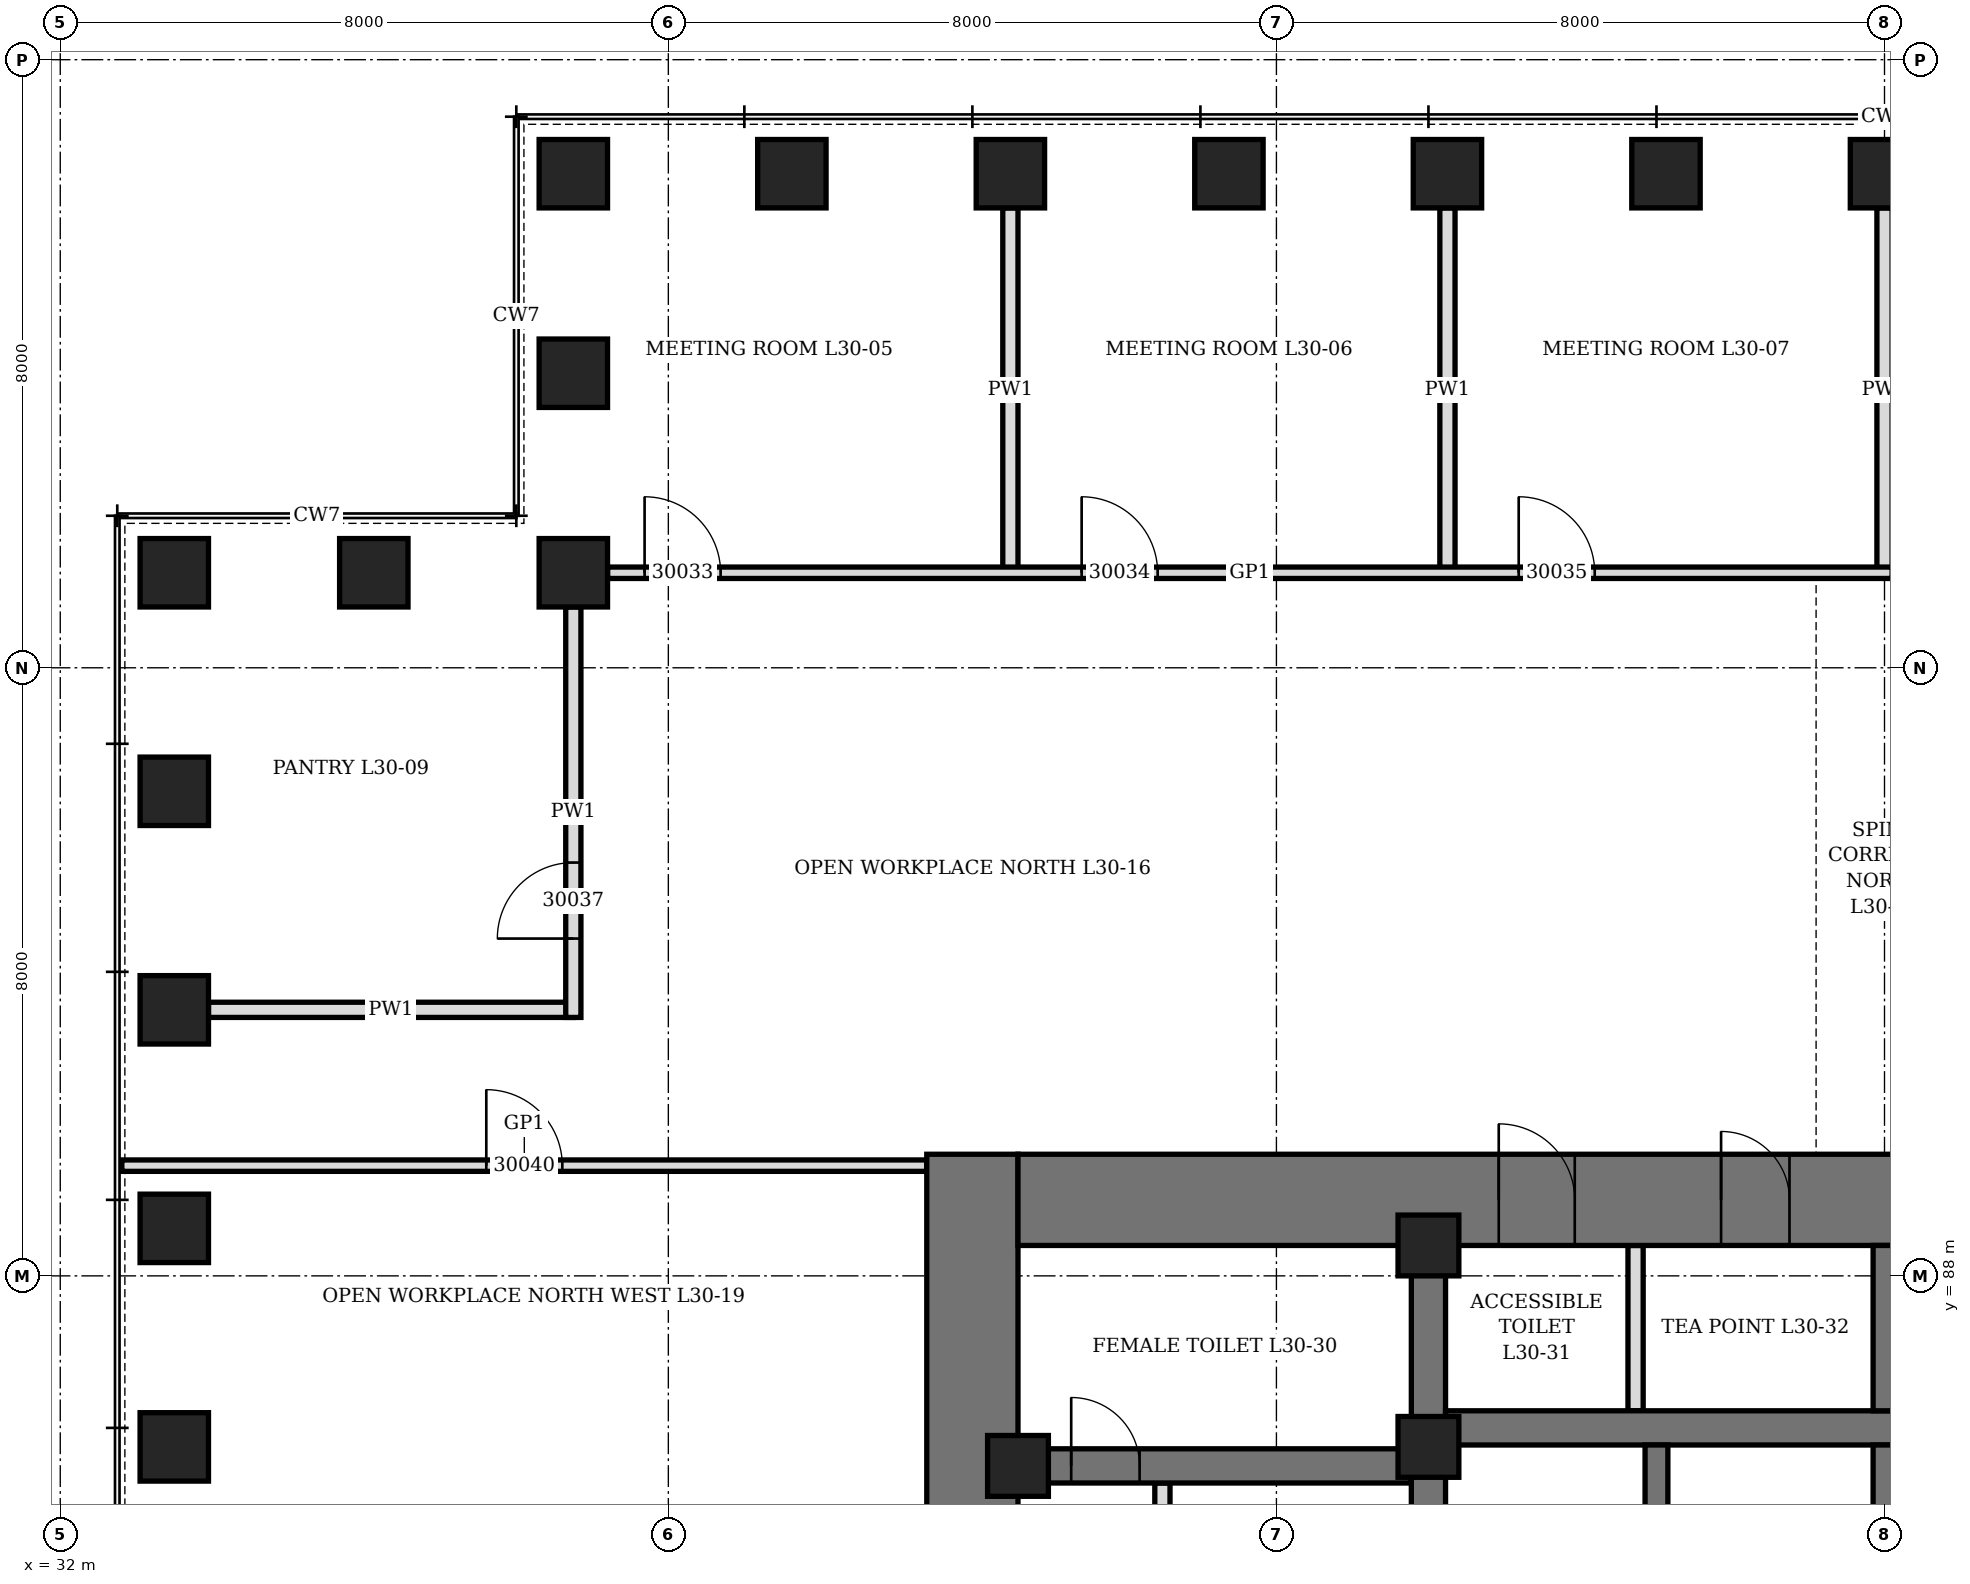
"""IFC4 building model, lengths in metres.
Left out: names, types, materials, properties, quantities, classifications, styles, units other than length and angle.
Written with IfcOpenShell. Run it as: python <this file> out.ifc"""

import sys

from ifc_helpers import new_model, si_unit, direction, frame, frame_2d, origin, origin_2d, place, context, subcontext, project, spatial, rectangle, hollow_rectangle, extrude, element, fill, save


model = new_model("IFC4")
c1 = context("Model", 3, precision=1e-05, world=origin(), true_north=direction((0.0, 1.0)))
c2 = subcontext(c1, "Body", "Model", "MODEL_VIEW")
j1 = project(units=[si_unit("LENGTHUNIT", "METRE"), si_unit("PLANEANGLEUNIT", "RADIAN")], contexts=[c1])
p1 = place(None, origin())
s1 = spatial("IfcSite", under=j1, at=p1, CompositionType="ELEMENT")
p2 = place(p1, origin())
s2 = spatial("IfcBuilding", under=s1, at=p2, CompositionType="ELEMENT")
p3 = place(p2, frame((0.0, 0.0, 137.5)))
s3 = spatial("IfcBuildingStorey", under=s2, at=p3, CompositionType="ELEMENT", Elevation=137.5)
for number, where, z_axis, x_axis in (
    (1, (56.0, 102.5, 0.0), (0.0, 0.0, 1.0), (1.0, 0.0, 0.0)),
    (2, (53.125, 102.5, 0.0), (0.0, 0.0, 1.0), (1.0, 0.0, 0.0)),
    (3, (50.25, 102.5, 0.0), (0.0, 0.0, 1.0), (1.0, 0.0, 0.0)),
    (4, (47.375, 102.5, 0.0), (0.0, 0.0, 1.0), (1.0, 0.0, 0.0)),
    (5, (44.5, 102.5, 0.0), (0.0, 0.0, 1.0), (1.0, 0.0, 0.0)),
    (6, (41.625, 102.5, 0.0), (0.0, 0.0, 1.0), (1.0, 0.0, 0.0)),
    (7, (38.75, 102.5, 0.0), (0.0, 0.0, 1.0), (0.0, 1.0, 0.0)),
    (8, (38.75, 99.875, 0.0), (0.0, 0.0, 1.0), (0.0, 1.0, 0.0)),
    (9, (38.75, 97.25, 0.0), (0.0, 0.0, 1.0), (1.0, 0.0, 0.0)),
    (10, (36.125, 97.25, 0.0), (0.0, 0.0, 1.0), (1.0, 0.0, 0.0)),
    (11, (33.5, 97.25, 0.0), (0.0, 0.0, 1.0), (0.0, 1.0, 0.0)),
    (12, (33.5, 94.375, 0.0), (0.0, 0.0, 1.0), (0.0, 1.0, 0.0)),
    (13, (33.5, 91.5, 0.0), (0.0, 0.0, 1.0), (0.0, 1.0, 0.0)),
    (14, (33.5, 88.625, 0.0), (0.0, 0.0, 1.0), (0.0, 1.0, 0.0)),
    (15, (33.5, 85.75, 0.0), (0.0, 0.0, 1.0), (0.0, 1.0, 0.0)),
):
    element("IfcColumn", number, at=place(p3, frame(where, z_axis=z_axis, x_axis=x_axis)), inside=s3, PredefinedType="COLUMN", context=c2, shape_type="SweptSolid", body=[
        extrude(hollow_rectangle(XDim=0.9, YDim=0.9, WallThickness=0.15, at=origin_2d()), origin(), (0.0, 0.0, 1.0), 4.2),
    ])
p4 = place(p3, frame((44.0, 70.4, 0.0), z_axis=(0.0, 0.0, 1.0), x_axis=(0.0, 1.0, 0.0)))
e16 = element("IfcWall", 16, at=p4, inside=s3, PredefinedType="SHEAR", context=c2, shape_type="SweptSolid", body=[
    extrude(rectangle(XDim=19.2, YDim=1.2, at=frame_2d((9.6, 0.0))), origin(), (0.0, 0.0, 1.0), 4.2),
])
p5 = place(p4, frame((8.6, 0.0, 0.0)))
e17 = element("IfcOpeningElement", 17, at=p5, cuts=e16, PredefinedType="OPENING", context=c2, shape_type="SweptSolid", body=[
    extrude(rectangle(XDim=2.0, YDim=2.4, at=frame_2d((1.0, 1.2))), frame((0.0, 0.61, 0.0), z_axis=(0.0, -1.0, 0.0), x_axis=(1.0, 0.0, 0.0)), (0.0, 0.0, 1.0), 1.22),
])
p6 = place(p3, frame((44.6, 89.0, 0.0), z_axis=(0.0, 0.0, 1.0), x_axis=(1.0, 0.0, 0.0)))
e18 = element("IfcWall", 18, at=p6, inside=s3, PredefinedType="SHEAR", context=c2, shape_type="SweptSolid", body=[
    extrude(rectangle(XDim=22.8, YDim=1.2, at=frame_2d((11.4, 0.0))), origin(), (0.0, 0.0, 1.0), 4.2),
])
p7 = place(p6, frame((6.325, 0.0, 0.0)))
e19 = element("IfcOpeningElement", 19, at=p7, cuts=e18, PredefinedType="OPENING", context=c2, shape_type="SweptSolid", body=[
    extrude(rectangle(XDim=1.0, YDim=2.1, at=frame_2d((0.5, 1.05))), frame((0.0, 0.61, 0.0), z_axis=(0.0, -1.0, 0.0), x_axis=(1.0, 0.0, 0.0)), (0.0, 0.0, 1.0), 1.22),
])
p8 = place(p6, frame((9.25, 0.0, 0.0)))
e20 = element("IfcOpeningElement", 20, at=p8, cuts=e18, PredefinedType="OPENING", context=c2, shape_type="SweptSolid", body=[
    extrude(rectangle(XDim=0.9, YDim=2.1, at=frame_2d((0.45, 1.05))), frame((0.0, 0.61, 0.0), z_axis=(0.0, -1.0, 0.0), x_axis=(1.0, 0.0, 0.0)), (0.0, 0.0, 1.0), 1.22),
])
p9 = place(p6, frame((12.025, 0.0, 0.0)))
e21 = element("IfcOpeningElement", 21, at=p9, cuts=e18, PredefinedType="OPENING", context=c2, shape_type="SweptSolid", body=[
    extrude(rectangle(XDim=0.9, YDim=2.1, at=frame_2d((0.45, 1.05))), frame((0.0, 0.61, 0.0), z_axis=(0.0, -1.0, 0.0), x_axis=(1.0, 0.0, 0.0)), (0.0, 0.0, 1.0), 1.22),
])
p10 = place(p6, frame((13.962, 0.0, 0.0)))
e22 = element("IfcOpeningElement", 22, at=p10, cuts=e18, PredefinedType="OPENING", context=c2, shape_type="SweptSolid", body=[
    extrude(rectangle(XDim=0.9, YDim=2.1, at=frame_2d((0.45, 1.05))), frame((0.0, 0.61, 0.0), z_axis=(0.0, -1.0, 0.0), x_axis=(1.0, 0.0, 0.0)), (0.0, 0.0, 1.0), 1.22),
])
p11 = place(p3, frame((50.0, 71.6, 0.0), z_axis=(0.0, 0.0, 1.0), x_axis=(0.0, 1.0, 0.0)))
e23 = element("IfcWall", 23, at=p11, inside=s3, PredefinedType="SHEAR", context=c2, shape_type="SweptSolid", body=[
    extrude(rectangle(XDim=16.8, YDim=0.45, at=frame_2d((8.4, 0.0))), origin(), (0.0, 0.0, 1.0), 4.2),
])
p12 = place(p11, frame((7.5, 0.0, 0.0)))
e24 = element("IfcOpeningElement", 24, at=p12, cuts=e23, PredefinedType="OPENING", context=c2, shape_type="SweptSolid", body=[
    extrude(rectangle(XDim=1.8, YDim=2.4, at=frame_2d((0.9, 1.2))), frame((0.0, 0.235, 0.0), z_axis=(0.0, -1.0, 0.0), x_axis=(1.0, 0.0, 0.0)), (0.0, 0.0, 1.0), 0.47),
])
p13 = place(p3, frame((44.6, 85.5, 0.0), z_axis=(0.0, 0.0, 1.0), x_axis=(1.0, 0.0, 0.0)))
e25 = element("IfcWall", 25, at=p13, inside=s3, PredefinedType="SHEAR", context=c2, shape_type="SweptSolid", body=[
    extrude(rectangle(XDim=5.175, YDim=0.45, at=frame_2d((2.587, 0.0))), origin(), (0.0, 0.0, 1.0), 4.2),
])
p14 = place(p13, frame((0.7, 0.0, 0.0)))
e26 = element("IfcOpeningElement", 26, at=p14, cuts=e25, PredefinedType="OPENING", context=c2, shape_type="SweptSolid", body=[
    extrude(rectangle(XDim=0.9, YDim=2.1, at=frame_2d((0.45, 1.05))), frame((0.0, 0.235, 0.0), z_axis=(0.0, -1.0, 0.0), x_axis=(1.0, 0.0, 0.0)), (0.0, 0.0, 1.0), 0.47),
])
p15 = place(p3, frame((50.225, 86.0, 0.0), z_axis=(0.0, 0.0, 1.0), x_axis=(1.0, 0.0, 0.0)))
e27 = element("IfcWall", 27, at=p15, inside=s3, PredefinedType="SHEAR", context=c2, shape_type="SweptSolid", body=[
    extrude(rectangle(XDim=11.55, YDim=0.45, at=frame_2d((5.775, 0.0))), origin(), (0.0, 0.0, 1.0), 4.2),
])
for number, where, z_axis, x_axis in (
    (28, (53.0, 82.225, 0.0), (0.0, 0.0, 1.0), (0.0, 1.0, 0.0)),
    (29, (56.0, 82.225, 0.0), (0.0, 0.0, 1.0), (0.0, 1.0, 0.0)),
):
    element("IfcWall", number, at=place(p3, frame(where, z_axis=z_axis, x_axis=x_axis)), inside=s3, PredefinedType="SHEAR", context=c2, shape_type="SweptSolid", body=[
        extrude(rectangle(XDim=3.55, YDim=0.3, at=frame_2d((1.775, 0.0))), origin(), (0.0, 0.0, 1.0), 4.2),
    ])
p16 = place(p3, frame((56.0, 86.225, 0.0), z_axis=(0.0, 0.0, 1.0), x_axis=(0.0, 1.0, 0.0)))
e30 = element("IfcWall", 30, at=p16, inside=s3, PredefinedType="SHEAR", context=c2, shape_type="SweptSolid", body=[
    extrude(rectangle(XDim=2.175, YDim=0.3, at=frame_2d((1.087, 0.0))), origin(), (0.0, 0.0, 1.0), 4.2),
])
for number, where, z_axis, x_axis in (
    (31, (44.6, 85.5, 0.0), (0.0, 0.0, 1.0), (1.0, 0.0, 0.0)),
    (32, (50.0, 85.75, 0.0), (0.0, 0.0, 1.0), (1.0, 0.0, 0.0)),
    (33, (50.0, 88.4, 0.0), (0.0, 0.0, 1.0), (1.0, 0.0, 0.0)),
):
    element("IfcColumn", number, at=place(p3, frame(where, z_axis=z_axis, x_axis=x_axis)), inside=s3, PredefinedType="COLUMN", context=c2, shape_type="SweptSolid", body=[
        extrude(hollow_rectangle(XDim=0.8, YDim=0.8, WallThickness=0.1, at=origin_2d()), origin(), (0.0, 0.0, 1.0), 4.2),
    ])
p17 = place(p3, frame((46.5, 82.225, 0.0), z_axis=(0.0, 0.0, 1.0), x_axis=(0.0, 1.0, 0.0)))
e34 = element("IfcWall", 34, at=p17, inside=s3, PredefinedType="PARTITIONING", context=c2, shape_type="SweptSolid", body=[
    extrude(rectangle(XDim=3.05, YDim=0.2, at=frame_2d((1.525, 0.0))), origin(), (0.0, 0.0, 1.0), 4.04),
])
p18 = place(p17, frame((1.075, 0.0, 0.0)))
e35 = element("IfcOpeningElement", 35, at=p18, cuts=e34, PredefinedType="OPENING", context=c2, shape_type="SweptSolid", body=[
    extrude(rectangle(XDim=0.9, YDim=2.1, at=frame_2d((0.45, 1.05))), frame((0.0, 0.11, 0.0), z_axis=(0.0, -1.0, 0.0), x_axis=(1.0, 0.0, 0.0)), (0.0, 0.0, 1.0), 0.22),
])
p19 = place(p3, frame((52.725, 86.225, 0.0), z_axis=(0.0, 0.0, 1.0), x_axis=(0.0, 1.0, 0.0)))
e36 = element("IfcWall", 36, at=p19, inside=s3, PredefinedType="PARTITIONING", context=c2, shape_type="SweptSolid", body=[
    extrude(rectangle(XDim=2.175, YDim=0.2, at=frame_2d((1.087, 0.0))), origin(), (0.0, 0.0, 1.0), 4.04),
])
p20 = place(p3, frame((44.5, 97.25, 0.0), z_axis=(0.0, 0.0, 1.0), x_axis=(0.0, 1.0, 0.0)))
e37 = element("IfcWall", 37, at=p20, inside=s3, PredefinedType="PARTITIONING", context=c2, shape_type="SweptSolid", body=[
    extrude(rectangle(XDim=4.8, YDim=0.2, at=frame_2d((2.4, 0.0))), origin(), (0.0, 0.0, 1.0), 2.74),
])
for number, where, z_axis, x_axis in (
    (38, (50.25, 97.25, 0.0), (0.0, 0.0, 1.0), (0.0, 1.0, 0.0)),
    (39, (56.0, 97.25, 0.0), (0.0, 0.0, 1.0), (0.0, 1.0, 0.0)),
):
    element("IfcWall", number, at=place(p3, frame(where, z_axis=z_axis, x_axis=x_axis)), inside=s3, PredefinedType="PARTITIONING", context=c2, shape_type="SweptSolid", body=[
        extrude(rectangle(XDim=4.8, YDim=0.2, at=frame_2d((2.4, 0.0))), origin(), (0.0, 0.0, 1.0), 3.278),
    ])
p21 = place(p3, frame((33.95, 91.5, 0.0), z_axis=(0.0, 0.0, 1.0), x_axis=(1.0, 0.0, 0.0)))
e40 = element("IfcWall", 40, at=p21, inside=s3, PredefinedType="PARTITIONING", context=c2, shape_type="SweptSolid", body=[
    extrude(rectangle(XDim=4.8, YDim=0.2, at=frame_2d((2.4, 0.0))), origin(), (0.0, 0.0, 1.0), 3.428),
])
p22 = place(p3, frame((32.81, 89.45, 0.0), z_axis=(0.0, 0.0, 1.0), x_axis=(1.0, 0.0, 0.0)))
e41 = element("IfcWall", 41, at=p22, inside=s3, PredefinedType="PARTITIONING", context=c2, shape_type="SweptSolid", body=[
    extrude(rectangle(XDim=10.59, YDim=0.15, at=frame_2d((5.295, 0.0))), origin(), (0.0, 0.0, 1.0), 4.04),
])
p23 = place(p22, frame((4.795, 0.0, 0.0)))
e42 = element("IfcOpeningElement", 42, at=p23, cuts=e41, PredefinedType="OPENING", context=c2, shape_type="SweptSolid", body=[
    extrude(rectangle(XDim=1.0, YDim=2.4, at=frame_2d((0.5, 1.2))), frame((0.0, 0.085, 0.0), z_axis=(0.0, -1.0, 0.0), x_axis=(1.0, 0.0, 0.0)), (0.0, 0.0, 1.0), 0.17),
])
p24 = place(p3, frame((39.2, 97.25, 0.0), z_axis=(0.0, 0.0, 1.0), x_axis=(1.0, 0.0, 0.0)))
e43 = element("IfcWall", 43, at=p24, inside=s3, PredefinedType="PARTITIONING", context=c2, shape_type="SweptSolid", body=[
    extrude(rectangle(XDim=16.9, YDim=0.15, at=frame_2d((8.45, 0.0))), origin(), (0.0, 0.0, 1.0), 4.04),
])
p25 = place(p24, frame((0.488, 0.0, 0.0)))
e44 = element("IfcOpeningElement", 44, at=p25, cuts=e43, PredefinedType="OPENING", context=c2, shape_type="SweptSolid", body=[
    extrude(rectangle(XDim=1.0, YDim=2.4, at=frame_2d((0.5, 1.2))), frame((0.0, 0.085, 0.0), z_axis=(0.0, -1.0, 0.0), x_axis=(1.0, 0.0, 0.0)), (0.0, 0.0, 1.0), 0.17),
])
p26 = place(p24, frame((6.238, 0.0, 0.0)))
e45 = element("IfcOpeningElement", 45, at=p26, cuts=e43, PredefinedType="OPENING", context=c2, shape_type="SweptSolid", body=[
    extrude(rectangle(XDim=1.0, YDim=2.4, at=frame_2d((0.5, 1.2))), frame((0.0, 0.085, 0.0), z_axis=(0.0, -1.0, 0.0), x_axis=(1.0, 0.0, 0.0)), (0.0, 0.0, 1.0), 0.17),
])
p27 = place(p24, frame((11.988, 0.0, 0.0)))
e46 = element("IfcOpeningElement", 46, at=p27, cuts=e43, PredefinedType="OPENING", context=c2, shape_type="SweptSolid", body=[
    extrude(rectangle(XDim=1.0, YDim=2.4, at=frame_2d((0.5, 1.2))), frame((0.0, 0.085, 0.0), z_axis=(0.0, -1.0, 0.0), x_axis=(1.0, 0.0, 0.0)), (0.0, 0.0, 1.0), 0.17),
])
p28 = place(p3, frame((38.75, 91.4, 0.0), z_axis=(0.0, 0.0, 1.0), x_axis=(0.0, 1.0, 0.0)))
e47 = element("IfcWall", 47, at=p28, inside=s3, PredefinedType="PARTITIONING", context=c2, shape_type="SweptSolid", body=[
    extrude(rectangle(XDim=5.4, YDim=0.2, at=frame_2d((2.7, 0.0))), origin(), (0.0, 0.0, 1.0), 4.04),
])
p29 = place(p28, frame((1.038, 0.0, 0.0)))
e48 = element("IfcOpeningElement", 48, at=p29, cuts=e47, PredefinedType="OPENING", context=c2, shape_type="SweptSolid", body=[
    extrude(rectangle(XDim=1.0, YDim=2.1, at=frame_2d((0.5, 1.05))), frame((0.0, 0.11, 0.0), z_axis=(0.0, -1.0, 0.0), x_axis=(1.0, 0.0, 0.0)), (0.0, 0.0, 1.0), 0.22),
])
p30 = place(p14, origin())
e49 = element("IfcDoor", 49, at=p30, inside=s3, OperationType="SINGLE_SWING_RIGHT", PredefinedType="DOOR", context=c2, shape_type="SweptSolid", body=[
    extrude(rectangle(XDim=0.9, YDim=2.1, at=frame_2d((0.45, 1.05))), frame((0.0, 0.225, 0.0), z_axis=(0.0, -1.0, 0.0), x_axis=(1.0, 0.0, 0.0)), (0.0, 0.0, 1.0), 0.449),
])
fill(e26, e49)
p31 = place(p7, origin())
e50 = element("IfcDoor", 50, at=p31, inside=s3, OperationType="SINGLE_SWING_LEFT", PredefinedType="DOOR", context=c2, shape_type="SweptSolid", body=[
    extrude(rectangle(XDim=1.0, YDim=2.1, at=frame_2d((0.5, 1.05))), frame((0.0, 0.35, 0.0), z_axis=(0.0, -1.0, 0.0), x_axis=(1.0, 0.0, 0.0)), (0.0, 0.0, 1.0), 0.7),
])
fill(e19, e50)
p32 = place(p8, origin())
e51 = element("IfcDoor", 51, at=p32, inside=s3, OperationType="SINGLE_SWING_LEFT", PredefinedType="DOOR", context=c2, shape_type="SweptSolid", body=[
    extrude(rectangle(XDim=0.9, YDim=2.1, at=frame_2d((0.45, 1.05))), frame((0.0, 0.35, 0.0), z_axis=(0.0, -1.0, 0.0), x_axis=(1.0, 0.0, 0.0)), (0.0, 0.0, 1.0), 0.7),
])
fill(e20, e51)
p33 = place(p25, origin())
e52 = element("IfcDoor", 52, at=p33, inside=s3, OperationType="SINGLE_SWING_RIGHT", PredefinedType="DOOR", context=c2, shape_type="SweptSolid", body=[
    extrude(rectangle(XDim=1.0, YDim=2.4, at=frame_2d((0.5, 1.2))), frame((0.0, 0.075, 0.0), z_axis=(0.0, -1.0, 0.0), x_axis=(1.0, 0.0, 0.0)), (0.0, 0.0, 1.0), 0.149),
])
fill(e44, e52)
p34 = place(p26, origin())
e53 = element("IfcDoor", 53, at=p34, inside=s3, OperationType="SINGLE_SWING_RIGHT", PredefinedType="DOOR", context=c2, shape_type="SweptSolid", body=[
    extrude(rectangle(XDim=1.0, YDim=2.4, at=frame_2d((0.5, 1.2))), frame((0.0, 0.075, 0.0), z_axis=(0.0, -1.0, 0.0), x_axis=(1.0, 0.0, 0.0)), (0.0, 0.0, 1.0), 0.149),
])
fill(e45, e53)
p35 = place(p27, origin())
e54 = element("IfcDoor", 54, at=p35, inside=s3, OperationType="SINGLE_SWING_RIGHT", PredefinedType="DOOR", context=c2, shape_type="SweptSolid", body=[
    extrude(rectangle(XDim=1.0, YDim=2.4, at=frame_2d((0.5, 1.2))), frame((0.0, 0.075, 0.0), z_axis=(0.0, -1.0, 0.0), x_axis=(1.0, 0.0, 0.0)), (0.0, 0.0, 1.0), 0.149),
])
fill(e46, e54)
p36 = place(p29, origin())
e55 = element("IfcDoor", 55, at=p36, inside=s3, OperationType="SINGLE_SWING_LEFT", PredefinedType="DOOR", context=c2, shape_type="SweptSolid", body=[
    extrude(rectangle(XDim=1.0, YDim=2.1, at=frame_2d((0.5, 1.05))), frame((0.0, 0.1, 0.0), z_axis=(0.0, -1.0, 0.0), x_axis=(1.0, 0.0, 0.0)), (0.0, 0.0, 1.0), 0.199),
])
fill(e48, e55)
p37 = place(p23, origin())
e56 = element("IfcDoor", 56, at=p37, inside=s3, OperationType="SINGLE_SWING_RIGHT", PredefinedType="DOOR", context=c2, shape_type="SweptSolid", body=[
    extrude(rectangle(XDim=1.0, YDim=2.4, at=frame_2d((0.5, 1.2))), frame((0.0, 0.075, 0.0), z_axis=(0.0, -1.0, 0.0), x_axis=(1.0, 0.0, 0.0)), (0.0, 0.0, 1.0), 0.149),
])
fill(e42, e56)
save(model, sys.argv[1])
